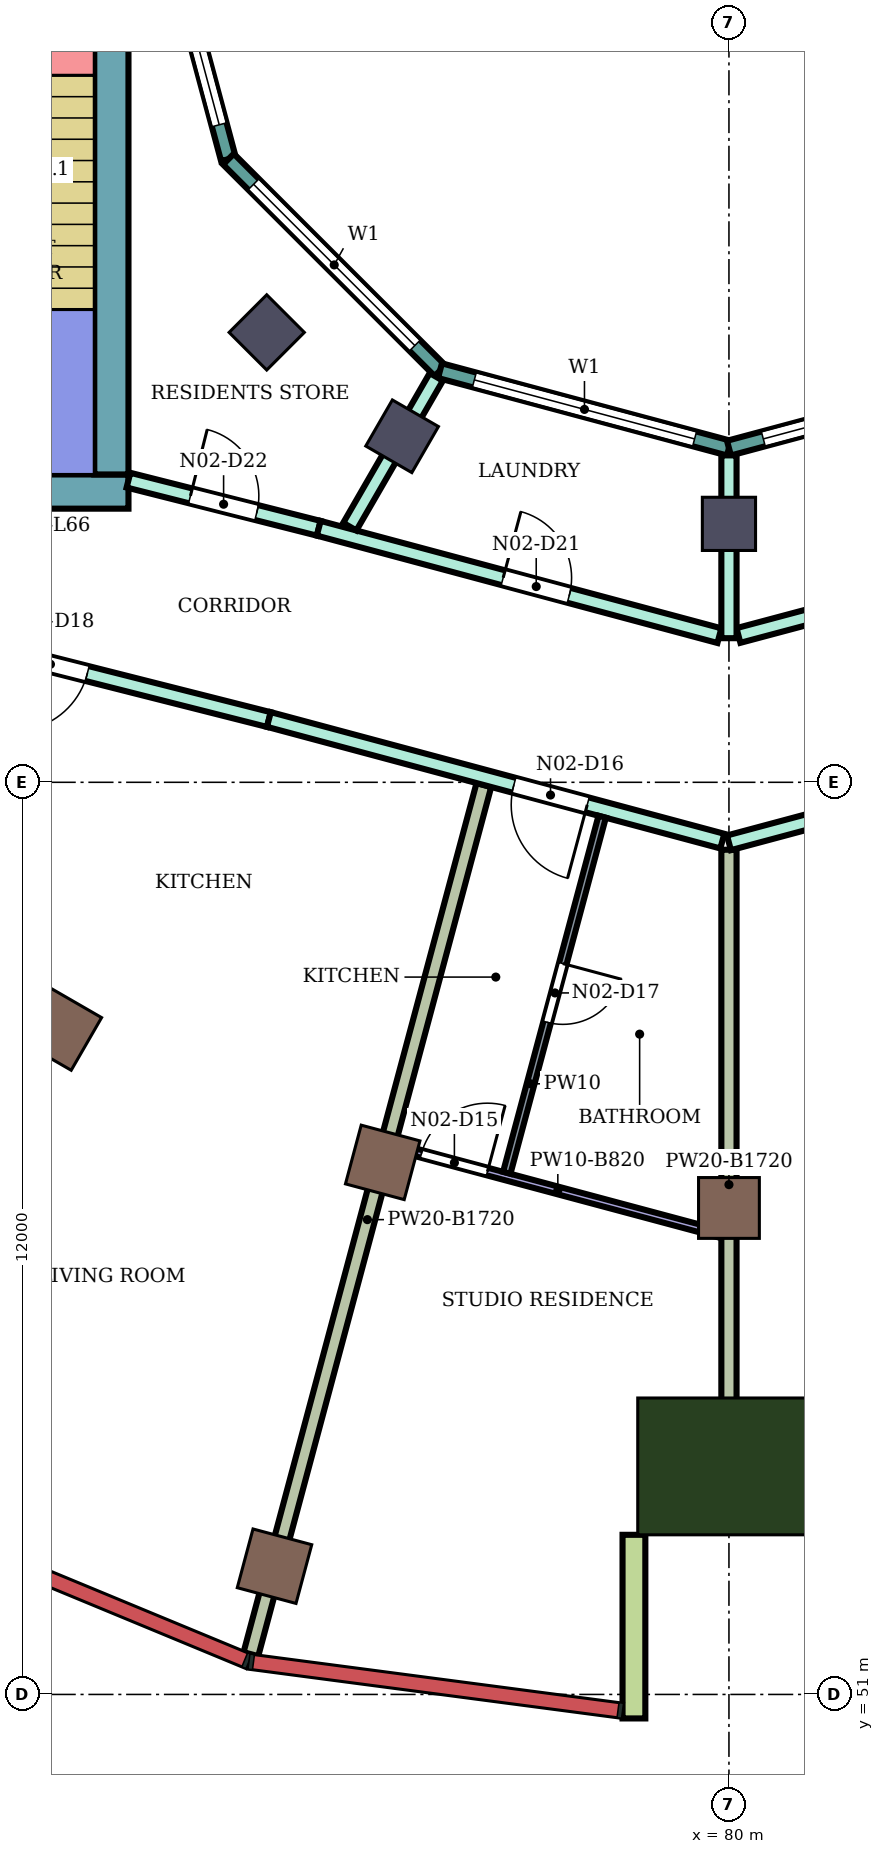
"""IFC4 building model, lengths in metres.
Left out: names, types, materials, properties, quantities, classifications, styles, units other than length and angle.
Written with IfcOpenShell. Run it as: python <this file> out.ifc"""

import sys

from ifc_helpers import new_model, si_unit, direction, frame, frame_2d, origin, origin_2d, place, context, subcontext, project, spatial, rectangle, extrude, element, fill, save


model = new_model("IFC4")
c1 = context("Model", 3, precision=1e-05, world=origin(), true_north=direction((0.0, 1.0)))
c2 = subcontext(c1, "Body", "Model", "MODEL_VIEW")
j1 = project(units=[si_unit("LENGTHUNIT", "METRE"), si_unit("PLANEANGLEUNIT", "RADIAN")], contexts=[c1])
p1 = place(None, origin())
s1 = spatial("IfcSite", under=j1, at=p1, CompositionType="ELEMENT")
p2 = place(p1, origin())
s2 = spatial("IfcBuilding", under=s1, at=p2, CompositionType="ELEMENT")
p3 = place(p2, frame((0.0, 0.0, 288.3)))
s3 = spatial("IfcBuildingStorey", under=s2, at=p3, CompositionType="ELEMENT", Elevation=288.3)
for number, where, z_axis, x_axis in (
    (1, (74.021, 52.687, 0.0), (0.0, 0.0, 1.0), (-0.259, -0.966, 0.0)),
    (2, (71.2, 59.758, 0.0), (0.0, 0.0, 1.0), (-0.5, -0.866, 0.0)),
    (3, (75.445, 58.0, 0.0), (0.0, 0.0, 1.0), (-0.259, -0.966, 0.0)),
    (4, (80.0, 57.4, 0.0), (0.0, 0.0, 1.0), (0.0, -1.0, 0.0)),
):
    element("IfcColumn", number, at=place(p3, frame(where, z_axis=z_axis, x_axis=x_axis)), inside=s3, PredefinedType="COLUMN", context=c2, shape_type="SweptSolid", body=[
        extrude(rectangle(XDim=0.8, YDim=0.8, at=origin_2d()), origin(), (0.0, 0.0, 1.0), 4.2),
    ])
for number, where, z_axis, x_axis in (
    (5, (73.919, 68.919, 0.0), (0.0, 0.0, 1.0), (-0.707, -0.707, 0.0)),
    (6, (75.7, 67.552, 0.0), (0.0, 0.0, 1.0), (-0.5, -0.866, 0.0)),
    (7, (80.0, 66.4, 0.0), (0.0, 0.0, 1.0), (0.0, -1.0, 0.0)),
):
    element("IfcColumn", number, at=place(p3, frame(where, z_axis=z_axis, x_axis=x_axis)), inside=s3, PredefinedType="COLUMN", context=c2, shape_type="SweptSolid", body=[
        extrude(rectangle(XDim=0.7, YDim=0.7, at=origin_2d()), origin(), (0.0, 0.0, 1.0), 4.2),
    ])
p4 = place(p3, frame((80.0, 54.0, 0.0), z_axis=(0.0, 0.0, 1.0), x_axis=(0.0, -1.0, 0.0)))
e8 = element("IfcColumn", 8, at=p4, inside=s3, PredefinedType="COLUMN", context=c2, shape_type="SweptSolid", body=[
    extrude(rectangle(XDim=1.8, YDim=2.4, at=origin_2d()), origin(), (0.0, 0.0, 1.0), 4.2),
])
p5 = place(p3, frame((72.1, 66.825, 0.0), z_axis=(0.0, 0.0, 1.0), x_axis=(-1.0, 0.0, 0.0)))
e9 = element("IfcWall", 9, at=p5, inside=s3, PredefinedType="SHEAR", context=c2, shape_type="SweptSolid", body=[
    extrude(rectangle(XDim=13.55, YDim=0.45, at=frame_2d((6.775, 0.0))), origin(), (0.0, 0.0, 1.0), 3.88),
])
p6 = place(p5, frame((4.2, 0.0, 0.0)))
e10 = element("IfcOpeningElement", 10, at=p6, cuts=e9, PredefinedType="OPENING", context=c2, shape_type="SweptSolid", body=[
    extrude(rectangle(XDim=2.4, YDim=2.4, at=frame_2d((1.2, 1.2))), frame((0.0, 0.235, 0.0), z_axis=(0.0, -1.0, 0.0), x_axis=(1.0, 0.0, 0.0)), (0.0, 0.0, 1.0), 0.47),
])
p7 = place(p3, frame((71.875, 75.0, 0.0), z_axis=(0.0, 0.0, 1.0), x_axis=(0.0, -1.0, 0.0)))
e11 = element("IfcWall", 11, at=p7, inside=s3, PredefinedType="SHEAR", context=c2, shape_type="SweptSolid", body=[
    extrude(rectangle(XDim=7.95, YDim=0.45, at=frame_2d((3.975, 0.0))), origin(), (0.0, 0.0, 1.0), 3.88),
])
p8 = place(p3, frame((78.75, 53.1, 0.0), z_axis=(0.0, 0.0, 1.0), x_axis=(0.0, -1.0, 0.0)))
e12 = element("IfcWall", 12, at=p8, inside=s3, PredefinedType="NOTDEFINED", context=c2, shape_type="SweptSolid", body=[
    extrude(rectangle(XDim=2.416, YDim=0.3, at=frame_2d((1.208, 0.0))), origin(), (0.0, 0.0, 1.0), 4.2),
])
p9 = place(p3, frame((72.396, 75.0, 0.0), z_axis=(0.0, 0.0, 1.0), x_axis=(0.258789828301, -0.965933654434, 0.0)))
e13 = element("IfcWall", 13, at=p9, inside=s3, PredefinedType="NOTDEFINED", context=c2, shape_type="SweptSolid", body=[
    extrude(rectangle(XDim=3.936, YDim=0.2, at=frame_2d((1.968, 0.0))), origin(), (0.0, 0.0, 1.0), 4.2),
])
p10 = place(p9, frame((0.468, 0.0, 0.9)))
e14 = element("IfcOpeningElement", 14, at=p10, cuts=e13, PredefinedType="OPENING", context=c2, shape_type="SweptSolid", body=[
    extrude(rectangle(XDim=3.0, YDim=2.3, at=frame_2d((1.5, 1.15))), frame((0.0, 0.11, 0.0), z_axis=(0.0, -1.0, 0.0), x_axis=(1.0, 0.0, 0.0)), (0.0, 0.0, 1.0), 0.22),
])
p11 = place(p3, frame((73.415, 71.198, 0.0), z_axis=(0.0, 0.0, 1.0), x_axis=(0.707106781187, -0.707106781187, 0.0)))
e15 = element("IfcWall", 15, at=p11, inside=s3, PredefinedType="NOTDEFINED", context=c2, shape_type="SweptSolid", body=[
    extrude(rectangle(XDim=3.936, YDim=0.2, at=frame_2d((1.968, 0.0))), origin(), (0.0, 0.0, 1.0), 4.2),
])
p12 = place(p11, frame((0.468, 0.0, 0.9)))
e16 = element("IfcOpeningElement", 16, at=p12, cuts=e15, PredefinedType="OPENING", context=c2, shape_type="SweptSolid", body=[
    extrude(rectangle(XDim=3.0, YDim=2.3, at=frame_2d((1.5, 1.15))), frame((0.0, 0.11, 0.0), z_axis=(0.0, -1.0, 0.0), x_axis=(1.0, 0.0, 0.0)), (0.0, 0.0, 1.0), 0.22),
])
p13 = place(p3, frame((76.198, 68.415, 0.0), z_axis=(0.0, 0.0, 1.0), x_axis=(0.965933654434, -0.258789828301, 0.0)))
e17 = element("IfcWall", 17, at=p13, inside=s3, PredefinedType="NOTDEFINED", context=c2, shape_type="SweptSolid", body=[
    extrude(rectangle(XDim=3.936, YDim=0.2, at=frame_2d((1.968, 0.0))), origin(), (0.0, 0.0, 1.0), 4.2),
])
p14 = place(p13, frame((0.468, 0.0, 0.9)))
e18 = element("IfcOpeningElement", 18, at=p14, cuts=e17, PredefinedType="OPENING", context=c2, shape_type="SweptSolid", body=[
    extrude(rectangle(XDim=3.0, YDim=2.3, at=frame_2d((1.5, 1.15))), frame((0.0, 0.11, 0.0), z_axis=(0.0, -1.0, 0.0), x_axis=(1.0, 0.0, 0.0)), (0.0, 0.0, 1.0), 0.22),
])
p15 = place(p3, frame((80.0, 67.396, 0.0), z_axis=(0.0, 0.0, 1.0), x_axis=(0.965933654434, 0.258789828301, 0.0)))
e19 = element("IfcWall", 19, at=p15, inside=s3, PredefinedType="NOTDEFINED", context=c2, shape_type="SweptSolid", body=[
    extrude(rectangle(XDim=3.936, YDim=0.2, at=frame_2d((1.968, 0.0))), origin(), (0.0, 0.0, 1.0), 4.2),
])
p16 = place(p15, frame((0.468, 0.0, 0.9)))
e20 = element("IfcOpeningElement", 20, at=p16, cuts=e19, PredefinedType="OPENING", context=c2, shape_type="SweptSolid", body=[
    extrude(rectangle(XDim=3.0, YDim=2.3, at=frame_2d((1.5, 1.15))), frame((0.0, 0.11, 0.0), z_axis=(0.0, -1.0, 0.0), x_axis=(1.0, 0.0, 0.0)), (0.0, 0.0, 1.0), 0.22),
])
p17 = place(p3, frame((68.201, 65.28, 0.0), z_axis=(0.0, 0.0, 1.0), x_axis=(0.969421088032, -0.245403247897, 0.0)))
e21 = element("IfcWall", 21, at=p17, inside=s3, PredefinedType="PARTITIONING", context=c2, shape_type="SweptSolid", body=[
    extrude(rectangle(XDim=5.927, YDim=0.2, at=frame_2d((2.964, 0.0))), origin(), (0.0, 0.0, 1.0), 3.75),
])
p18 = place(p17, frame((2.463, 0.0, 0.0)))
e22 = element("IfcOpeningElement", 22, at=p18, cuts=e21, PredefinedType="OPENING", context=c2, shape_type="SweptSolid", body=[
    extrude(rectangle(XDim=1.0, YDim=2.1, at=frame_2d((0.5, 1.05))), frame((0.0, 0.11, 0.0), z_axis=(0.0, -1.0, 0.0), x_axis=(1.0, 0.0, 0.0)), (0.0, 0.0, 1.0), 0.22),
])
p19 = place(p3, frame((72.1, 66.975, 0.0), z_axis=(0.0, 0.0, 1.0), x_axis=(0.969471314457, -0.245204752086, 0.0)))
e23 = element("IfcWall", 23, at=p19, inside=s3, PredefinedType="PARTITIONING", context=c2, shape_type="SweptSolid", body=[
    extrude(rectangle(XDim=2.582, YDim=0.2, at=frame_2d((1.291, 0.0))), origin(), (0.0, 0.0, 1.0), 3.75),
])
p20 = place(p19, frame((0.841, 0.0, 0.0)))
e24 = element("IfcOpeningElement", 24, at=p20, cuts=e23, PredefinedType="OPENING", context=c2, shape_type="SweptSolid", body=[
    extrude(rectangle(XDim=0.9, YDim=2.1, at=frame_2d((0.45, 1.05))), frame((0.0, 0.11, 0.0), z_axis=(0.0, -1.0, 0.0), x_axis=(1.0, 0.0, 0.0)), (0.0, 0.0, 1.0), 0.22),
])
p21 = place(p3, frame((73.711, 51.53, 0.0), z_axis=(0.0, 0.0, 1.0), x_axis=(0.258903780219, 0.965903117599, 0.0)))
e25 = element("IfcWall", 25, at=p21, inside=s3, PredefinedType="PARTITIONING", context=c2, shape_type="SweptSolid", body=[
    extrude(rectangle(XDim=11.837, YDim=0.2, at=frame_2d((5.918, 0.0))), origin(), (0.0, 0.0, 1.0), 2.48),
])
p22 = place(p3, frame((73.947, 63.826, 0.0), z_axis=(0.0, 0.0, 1.0), x_axis=(0.965862619462, -0.259054821082, 0.0)))
e26 = element("IfcWall", 26, at=p22, inside=s3, PredefinedType="PARTITIONING", context=c2, shape_type="SweptSolid", body=[
    extrude(rectangle(XDim=6.177, YDim=0.2, at=frame_2d((3.088, 0.0))), origin(), (0.0, 0.0, 1.0), 3.75),
])
p23 = place(p22, frame((3.336, 0.0, 0.0)))
e27 = element("IfcOpeningElement", 27, at=p23, cuts=e26, PredefinedType="OPENING", context=c2, shape_type="SweptSolid", body=[
    extrude(rectangle(XDim=1.0, YDim=2.1, at=frame_2d((0.5, 1.05))), frame((0.0, 0.11, 0.0), z_axis=(0.0, -1.0, 0.0), x_axis=(1.0, 0.0, 0.0)), (0.0, 0.0, 1.0), 0.22),
])
p24 = place(p3, frame((74.603, 66.342, 0.0), z_axis=(0.0, 0.0, 1.0), x_axis=(0.965920893652, -0.258837453254, 0.0)))
e28 = element("IfcWall", 28, at=p24, inside=s3, PredefinedType="PARTITIONING", context=c2, shape_type="SweptSolid", body=[
    extrude(rectangle(XDim=5.458, YDim=0.2, at=frame_2d((2.729, 0.0))), origin(), (0.0, 0.0, 1.0), 3.75),
])
p25 = place(p24, frame((2.512, 0.0, 0.0)))
e29 = element("IfcOpeningElement", 29, at=p25, cuts=e28, PredefinedType="OPENING", context=c2, shape_type="SweptSolid", body=[
    extrude(rectangle(XDim=0.9, YDim=2.1, at=frame_2d((0.45, 1.05))), frame((0.0, 0.11, 0.0), z_axis=(0.0, -1.0, 0.0), x_axis=(1.0, 0.0, 0.0)), (0.0, 0.0, 1.0), 0.22),
])
p26 = place(p3, frame((75.012, 66.363, 0.0), z_axis=(0.0, 0.0, 1.0), x_axis=(0.500143511652, 0.865942531438, 0.0)))
e30 = element("IfcWall", 30, at=p26, inside=s3, PredefinedType="PARTITIONING", context=c2, shape_type="SweptSolid", body=[
    extrude(rectangle(XDim=2.275, YDim=0.2, at=frame_2d((1.138, 0.0))), origin(), (0.0, 0.0, 1.0), 3.75),
])
p27 = place(p3, frame((80.125, 64.932, 0.0), z_axis=(0.0, 0.0, 1.0), x_axis=(0.966236955806, 0.257655089674, 0.0)))
e31 = element("IfcWall", 31, at=p27, inside=s3, PredefinedType="PARTITIONING", context=c2, shape_type="SweptSolid", body=[
    extrude(rectangle(XDim=8.039, YDim=0.2, at=frame_2d((4.02, 0.0))), origin(), (0.0, 0.0, 1.0), 3.75),
])
p28 = place(p27, frame((6.298, 0.0, 0.0)))
e32 = element("IfcOpeningElement", 32, at=p28, cuts=e31, PredefinedType="OPENING", context=c2, shape_type="SweptSolid", body=[
    extrude(rectangle(XDim=0.9, YDim=2.1, at=frame_2d((0.45, 1.05))), frame((0.0, 0.11, 0.0), z_axis=(0.0, -1.0, 0.0), x_axis=(1.0, 0.0, 0.0)), (0.0, 0.0, 1.0), 0.22),
])
p29 = place(p27, frame((2.045, 0.0, 0.0)))
e33 = element("IfcOpeningElement", 33, at=p29, cuts=e31, PredefinedType="OPENING", context=c2, shape_type="SweptSolid", body=[
    extrude(rectangle(XDim=0.9, YDim=2.1, at=frame_2d((0.45, 1.05))), frame((0.0, 0.11, 0.0), z_axis=(0.0, -1.0, 0.0), x_axis=(1.0, 0.0, 0.0)), (0.0, 0.0, 1.0), 0.22),
])
p30 = place(p3, frame((80.0, 53.301, 0.0), z_axis=(0.0, 0.0, 1.0), x_axis=(0.0, 1.0, 0.0)))
e34 = element("IfcWall", 34, at=p30, inside=s3, PredefinedType="PARTITIONING", context=c2, shape_type="SweptSolid", body=[
    extrude(rectangle(XDim=8.812, YDim=0.2, at=frame_2d((4.406, 0.0))), origin(), (0.0, 0.0, 1.0), 2.48),
])
p31 = place(p3, frame((80.0, 62.204, 0.0), z_axis=(0.0, 0.0, 1.0), x_axis=(0.965918660596, 0.258845786351, 0.0)))
e35 = element("IfcWall", 35, at=p31, inside=s3, PredefinedType="PARTITIONING", context=c2, shape_type="SweptSolid", body=[
    extrude(rectangle(XDim=6.267, YDim=0.2, at=frame_2d((3.133, 0.0))), origin(), (0.0, 0.0, 1.0), 3.75),
])
p32 = place(p31, frame((2.633, 0.0, 0.0)))
e36 = element("IfcOpeningElement", 36, at=p32, cuts=e35, PredefinedType="OPENING", context=c2, shape_type="SweptSolid", body=[
    extrude(rectangle(XDim=1.0, YDim=2.1, at=frame_2d((0.5, 1.05))), frame((0.0, 0.11, 0.0), z_axis=(0.0, -1.0, 0.0), x_axis=(1.0, 0.0, 0.0)), (0.0, 0.0, 1.0), 0.22),
])
p33 = place(p3, frame((80.0, 64.896, 0.0), z_axis=(0.0, 0.0, 1.0), x_axis=(0.0, 1.0, 0.0)))
e37 = element("IfcWall", 37, at=p33, inside=s3, PredefinedType="PARTITIONING", context=c2, shape_type="SweptSolid", body=[
    extrude(rectangle(XDim=2.405, YDim=0.2, at=frame_2d((1.203, 0.0))), origin(), (0.0, 0.0, 1.0), 3.75),
])
p34 = place(p3, frame((75.604, 58.205, 0.0), z_axis=(0.0, 0.0, 1.0), x_axis=(0.96596252401, -0.258682048483, 0.0)))
e38 = element("IfcWall", 38, at=p34, inside=s3, PredefinedType="PARTITIONING", context=c2, shape_type="SweptSolid", body=[
    extrude(rectangle(XDim=4.441, YDim=0.1, at=frame_2d((2.221, 0.0))), origin(), (0.0, 0.0, 1.0), 3.38),
])
p35 = place(p34, frame((0.362, 0.0, 0.0)))
e39 = element("IfcOpeningElement", 39, at=p35, cuts=e38, PredefinedType="OPENING", context=c2, shape_type="SweptSolid", body=[
    extrude(rectangle(XDim=0.9, YDim=2.1, at=frame_2d((0.45, 1.05))), frame((0.0, 0.06, 0.0), z_axis=(0.0, -1.0, 0.0), x_axis=(1.0, 0.0, 0.0)), (0.0, 0.0, 1.0), 0.12),
])
p36 = place(p3, frame((77.077, 57.862, 0.0), z_axis=(0.0, 0.0, 1.0), x_axis=(0.258774664065, 0.96593771706, 0.0)))
e40 = element("IfcWall", 40, at=p36, inside=s3, PredefinedType="PARTITIONING", context=c2, shape_type="SweptSolid", body=[
    extrude(rectangle(XDim=4.85, YDim=0.1, at=frame_2d((2.425, 0.0))), origin(), (0.0, 0.0, 1.0), 3.75),
])
p37 = place(p36, frame((2.05, 0.0, 0.0)))
e41 = element("IfcOpeningElement", 41, at=p37, cuts=e40, PredefinedType="OPENING", context=c2, shape_type="SweptSolid", body=[
    extrude(rectangle(XDim=0.8, YDim=2.1, at=frame_2d((0.4, 1.05))), frame((0.0, 0.06, 0.0), z_axis=(0.0, -1.0, 0.0), x_axis=(1.0, 0.0, 0.0)), (0.0, 0.0, 1.0), 0.12),
])
p38 = place(p10, origin())
e42 = element("IfcWindow", 42, at=p38, inside=s3, PartitioningType="SINGLE_PANEL", PredefinedType="WINDOW", context=c2, shape_type="SweptSolid", body=[
    extrude(rectangle(XDim=3.0, YDim=2.3, at=frame_2d((1.5, 1.15))), frame((0.0, 0.03, 0.0), z_axis=(0.0, -1.0, 0.0), x_axis=(1.0, 0.0, 0.0)), (0.0, 0.0, 1.0), 0.06),
])
fill(e14, e42)
p39 = place(p12, origin())
e43 = element("IfcWindow", 43, at=p39, inside=s3, PartitioningType="SINGLE_PANEL", PredefinedType="WINDOW", context=c2, shape_type="SweptSolid", body=[
    extrude(rectangle(XDim=3.0, YDim=2.3, at=frame_2d((1.5, 1.15))), frame((0.0, 0.03, 0.0), z_axis=(0.0, -1.0, 0.0), x_axis=(1.0, 0.0, 0.0)), (0.0, 0.0, 1.0), 0.06),
])
fill(e16, e43)
p40 = place(p14, origin())
e44 = element("IfcWindow", 44, at=p40, inside=s3, PartitioningType="SINGLE_PANEL", PredefinedType="WINDOW", context=c2, shape_type="SweptSolid", body=[
    extrude(rectangle(XDim=3.0, YDim=2.3, at=frame_2d((1.5, 1.15))), frame((0.0, 0.03, 0.0), z_axis=(0.0, -1.0, 0.0), x_axis=(1.0, 0.0, 0.0)), (0.0, 0.0, 1.0), 0.06),
])
fill(e18, e44)
p41 = place(p16, origin())
e45 = element("IfcWindow", 45, at=p41, inside=s3, PartitioningType="SINGLE_PANEL", PredefinedType="WINDOW", context=c2, shape_type="SweptSolid", body=[
    extrude(rectangle(XDim=3.0, YDim=2.3, at=frame_2d((1.5, 1.15))), frame((0.0, 0.03, 0.0), z_axis=(0.0, -1.0, 0.0), x_axis=(1.0, 0.0, 0.0)), (0.0, 0.0, 1.0), 0.06),
])
fill(e20, e45)
p42 = place(p35, origin())
e46 = element("IfcDoor", 46, at=p42, inside=s3, OperationType="SINGLE_SWING_RIGHT", PredefinedType="DOOR", context=c2, shape_type="SweptSolid", body=[
    extrude(rectangle(XDim=0.9, YDim=2.1, at=frame_2d((0.45, 1.05))), frame((0.0, 0.025, 0.0), z_axis=(0.0, -1.0, 0.0), x_axis=(1.0, 0.0, 0.0)), (0.0, 0.0, 1.0), 0.05),
])
fill(e39, e46)
p43 = place(p23, frame((1.0, 0.0, 0.0), z_axis=(0.0, 0.0, 1.0), x_axis=(-1.0, 0.0, 0.0)))
e47 = element("IfcDoor", 47, at=p43, inside=s3, OperationType="SINGLE_SWING_LEFT", PredefinedType="DOOR", context=c2, shape_type="SweptSolid", body=[
    extrude(rectangle(XDim=1.0, YDim=2.1, at=frame_2d((0.5, 1.05))), frame((0.0, 0.025, 0.0), z_axis=(0.0, -1.0, 0.0), x_axis=(1.0, 0.0, 0.0)), (0.0, 0.0, 1.0), 0.05),
])
fill(e27, e47)
p44 = place(p37, frame((0.8, 0.0, 0.0), z_axis=(0.0, 0.0, 1.0), x_axis=(-1.0, 0.0, 0.0)))
e48 = element("IfcDoor", 48, at=p44, inside=s3, OperationType="SINGLE_SWING_LEFT", PredefinedType="DOOR", context=c2, shape_type="SweptSolid", body=[
    extrude(rectangle(XDim=0.8, YDim=2.1, at=frame_2d((0.4, 1.05))), frame((0.0, 0.025, 0.0), z_axis=(0.0, -1.0, 0.0), x_axis=(1.0, 0.0, 0.0)), (0.0, 0.0, 1.0), 0.05),
])
fill(e41, e48)
p45 = place(p18, frame((1.0, 0.0, 0.0), z_axis=(0.0, 0.0, 1.0), x_axis=(-1.0, 0.0, 0.0)))
e49 = element("IfcDoor", 49, at=p45, inside=s3, OperationType="SINGLE_SWING_RIGHT", PredefinedType="DOOR", context=c2, shape_type="SweptSolid", body=[
    extrude(rectangle(XDim=1.0, YDim=2.1, at=frame_2d((0.5, 1.05))), frame((0.0, 0.025, 0.0), z_axis=(0.0, -1.0, 0.0), x_axis=(1.0, 0.0, 0.0)), (0.0, 0.0, 1.0), 0.05),
])
fill(e22, e49)
p46 = place(p25, origin())
e50 = element("IfcDoor", 50, at=p46, inside=s3, OperationType="SINGLE_SWING_LEFT", PredefinedType="DOOR", context=c2, shape_type="SweptSolid", body=[
    extrude(rectangle(XDim=0.9, YDim=2.1, at=frame_2d((0.45, 1.05))), frame((0.0, 0.025, 0.0), z_axis=(0.0, -1.0, 0.0), x_axis=(1.0, 0.0, 0.0)), (0.0, 0.0, 1.0), 0.05),
])
fill(e29, e50)
p47 = place(p20, origin())
e51 = element("IfcDoor", 51, at=p47, inside=s3, OperationType="SINGLE_SWING_LEFT", PredefinedType="DOOR", context=c2, shape_type="SweptSolid", body=[
    extrude(rectangle(XDim=0.9, YDim=2.1, at=frame_2d((0.45, 1.05))), frame((0.0, 0.025, 0.0), z_axis=(0.0, -1.0, 0.0), x_axis=(1.0, 0.0, 0.0)), (0.0, 0.0, 1.0), 0.05),
])
fill(e24, e51)
save(model, sys.argv[1])
